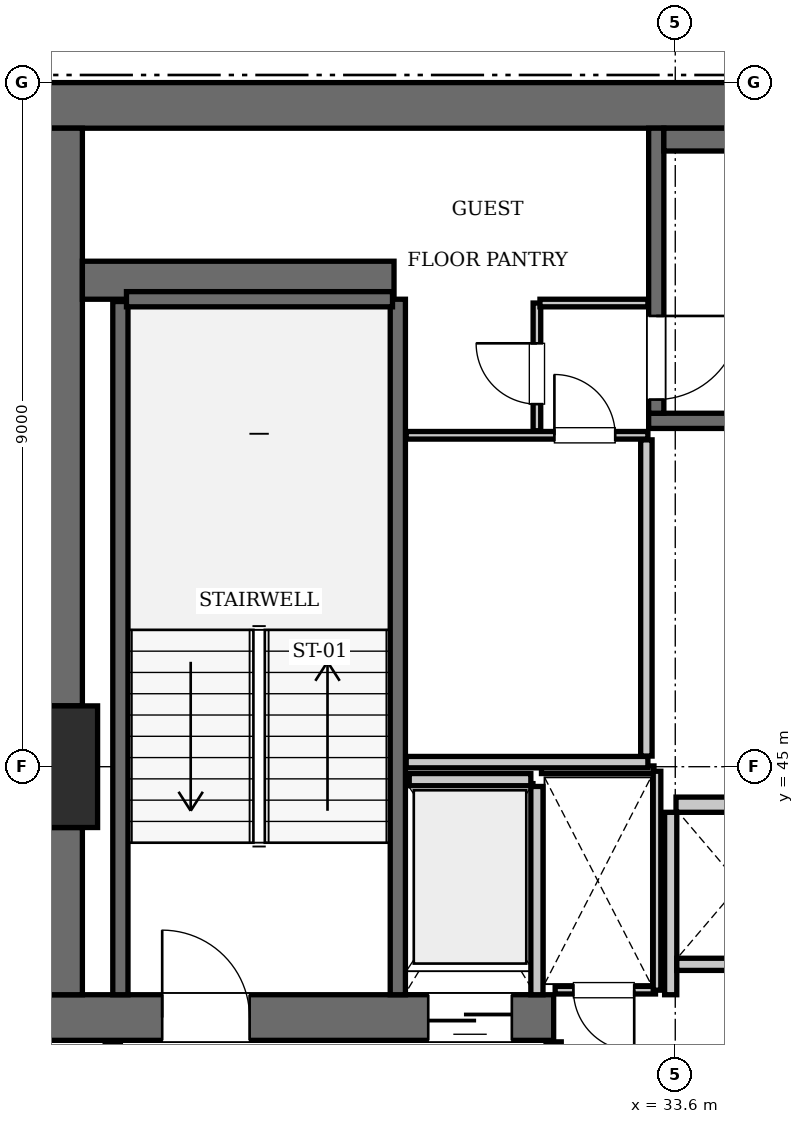
"""IFC4 building model, lengths in metres.
Left out: names, types, materials, properties, quantities, classifications, styles, units other than length and angle.
Written with IfcOpenShell. Run it as: python <this file> out.ifc"""

import sys

from ifc_helpers import new_model, si_unit, direction, frame, frame_2d, origin, origin_2d, place, context, subcontext, project, spatial, rectangle, extrude, element, fill, save


model = new_model("IFC4")
c1 = context("Model", 3, precision=1e-05, world=origin(), true_north=direction((0.0, 1.0)))
c2 = subcontext(c1, "Body", "Model", "MODEL_VIEW")
j1 = project(units=[si_unit("LENGTHUNIT", "METRE"), si_unit("PLANEANGLEUNIT", "RADIAN")], contexts=[c1])
p1 = place(None, origin())
s1 = spatial("IfcSite", under=j1, at=p1, CompositionType="ELEMENT")
p2 = place(p1, origin())
s2 = spatial("IfcBuilding", under=s1, at=p2, CompositionType="ELEMENT")
p3 = place(p2, frame((0.0, 0.0, 277.9)))
s3 = spatial("IfcBuildingStorey", under=s2, at=p3, CompositionType="ELEMENT", Elevation=277.9)
p4 = place(p3, frame((25.2, 45.0, 0.0), z_axis=(0.0, 0.0, 1.0), x_axis=(1.0, 0.0, 0.0)))
e1 = element("IfcColumn", 1, at=p4, inside=s3, PredefinedType="COLUMN", context=c2, shape_type="SweptSolid", body=[
    extrude(rectangle(XDim=1.6, YDim=1.6, at=origin_2d()), origin(), (0.0, 0.0, 1.0), 3.85),
])
p5 = place(p3, frame((25.2, 53.7, 0.0), z_axis=(0.0, 0.0, 1.0), x_axis=(1.0, 0.0, 0.0)))
e2 = element("IfcWall", 2, at=p5, inside=s3, PredefinedType="SHEAR", context=c2, shape_type="SweptSolid", body=[
    extrude(rectangle(XDim=25.2, YDim=0.6, at=frame_2d((12.6, 0.0))), origin(), (0.0, 0.0, 1.0), 3.85),
])
p6 = place(p3, frame((25.2, 41.7, 0.0), z_axis=(0.0, 0.0, 1.0), x_axis=(1.0, 0.0, 0.0)))
e3 = element("IfcWall", 3, at=p6, inside=s3, PredefinedType="SHEAR", context=c2, shape_type="SweptSolid", body=[
    extrude(rectangle(XDim=6.8, YDim=0.6, at=frame_2d((3.4, 0.0))), origin(), (0.0, 0.0, 1.0), 3.85),
])
p7 = place(p6, frame((1.65, 0.0, 0.0)))
e4 = element("IfcOpeningElement", 4, at=p7, cuts=e3, PredefinedType="OPENING", context=c2, shape_type="SweptSolid", body=[
    extrude(rectangle(XDim=1.15, YDim=2.15, at=frame_2d((0.575, 1.075))), frame((0.0, 0.31, 0.0), z_axis=(0.0, -1.0, 0.0), x_axis=(1.0, 0.0, 0.0)), (0.0, 0.0, 1.0), 0.62),
])
p8 = place(p6, frame((5.15, 0.0, 0.0)))
e5 = element("IfcOpeningElement", 5, at=p8, cuts=e3, PredefinedType="OPENING", context=c2, shape_type="SweptSolid", body=[
    extrude(rectangle(XDim=1.1, YDim=2.2, at=frame_2d((0.55, 1.1))), frame((0.0, 0.31, 0.0), z_axis=(0.0, -1.0, 0.0), x_axis=(1.0, 0.0, 0.0)), (0.0, 0.0, 1.0), 0.62),
])
p9 = place(p3, frame((25.5, 42.0, 0.0), z_axis=(0.0, 0.0, 1.0), x_axis=(0.0, 1.0, 0.0)))
e6 = element("IfcWall", 6, at=p9, inside=s3, PredefinedType="SHEAR", context=c2, shape_type="SweptSolid", body=[
    extrude(rectangle(XDim=2.2, YDim=0.6, at=frame_2d((1.1, 0.0))), origin(), (0.0, 0.0, 1.0), 3.85),
])
p10 = place(p3, frame((25.5, 45.8, 0.0), z_axis=(0.0, 0.0, 1.0), x_axis=(0.0, 1.0, 0.0)))
e7 = element("IfcWall", 7, at=p10, inside=s3, PredefinedType="SHEAR", context=c2, shape_type="SweptSolid", body=[
    extrude(rectangle(XDim=7.6, YDim=0.6, at=frame_2d((3.8, 0.0))), origin(), (0.0, 0.0, 1.0), 3.85),
])
p11 = place(p3, frame((25.8, 51.4, 0.0), z_axis=(0.0, 0.0, 1.0), x_axis=(1.0, 0.0, 0.0)))
e8 = element("IfcWall", 8, at=p11, inside=s3, PredefinedType="SHEAR", context=c2, shape_type="SweptSolid", body=[
    extrude(rectangle(XDim=4.1, YDim=0.5, at=frame_2d((2.05, 0.0))), origin(), (0.0, 0.0, 1.0), 3.85),
])
p12 = place(p3, frame((29.95, 42.0, 0.0), z_axis=(0.0, 0.0, 1.0), x_axis=(0.0, 1.0, 0.0)))
e9 = element("IfcWall", 9, at=p12, inside=s3, PredefinedType="SOLIDWALL", context=c2, shape_type="SweptSolid", body=[
    extrude(rectangle(XDim=9.15, YDim=0.2, at=frame_2d((4.575, 0.0))), origin(), (0.0, 0.0, 1.0), 3.61),
])
p13 = place(p3, frame((26.3, 42.0, 0.0), z_axis=(0.0, 0.0, 1.0), x_axis=(0.0, 1.0, 0.0)))
e10 = element("IfcWall", 10, at=p13, inside=s3, PredefinedType="SOLIDWALL", context=c2, shape_type="SweptSolid", body=[
    extrude(rectangle(XDim=9.12, YDim=0.2, at=frame_2d((4.56, 0.0))), origin(), (0.0, 0.0, 1.0), 3.61),
])
p14 = place(p3, frame((26.38, 51.15, 0.0), z_axis=(0.0, 0.0, 1.0), x_axis=(1.0, 0.0, 0.0)))
e11 = element("IfcWall", 11, at=p14, inside=s3, PredefinedType="SOLIDWALL", context=c2, shape_type="SweptSolid", body=[
    extrude(rectangle(XDim=3.5, YDim=0.2, at=frame_2d((1.75, 0.0))), origin(), (0.0, 0.0, 1.0), 3.61),
])
p15 = place(p3, frame((33.25, 49.55, 0.0), z_axis=(0.0, 0.0, 1.0), x_axis=(1.0, 0.0, 0.0)))
e12 = element("IfcWall", 12, at=p15, inside=s3, PredefinedType="SOLIDWALL", context=c2, shape_type="SweptSolid", body=[
    extrude(rectangle(XDim=9.1, YDim=0.2, at=frame_2d((4.55, 0.0))), origin(), (0.0, 0.0, 1.0), 3.61),
])
p16 = place(p3, frame((33.35, 49.65, 0.0), z_axis=(0.0, 0.0, 1.0), x_axis=(0.0, 1.0, 0.0)))
e13 = element("IfcWall", 13, at=p16, inside=s3, PredefinedType="SOLIDWALL", context=c2, shape_type="SweptSolid", body=[
    extrude(rectangle(XDim=3.75, YDim=0.2, at=frame_2d((1.875, 0.0))), origin(), (0.0, 0.0, 1.0), 3.61),
])
p17 = place(p16, frame((0.18, 0.0, 0.0)))
e14 = element("IfcOpeningElement", 14, at=p17, cuts=e13, PredefinedType="OPENING", context=c2, shape_type="SweptSolid", body=[
    extrude(rectangle(XDim=1.1, YDim=2.15, at=frame_2d((0.55, 1.075))), frame((0.0, 0.11, 0.0), z_axis=(0.0, -1.0, 0.0), x_axis=(1.0, 0.0, 0.0)), (0.0, 0.0, 1.0), 0.22),
])
p18 = place(p3, frame((33.45, 53.25, 0.0), z_axis=(0.0, 0.0, 1.0), x_axis=(1.0, 0.0, 0.0)))
e15 = element("IfcWall", 15, at=p18, inside=s3, PredefinedType="SOLIDWALL", context=c2, shape_type="SweptSolid", body=[
    extrude(rectangle(XDim=8.7, YDim=0.3, at=frame_2d((4.35, 0.0))), origin(), (0.0, 0.0, 1.0), 3.61),
])
p19 = place(p3, frame((33.61, 44.5, 0.0), z_axis=(0.0, 0.0, 1.0), x_axis=(1.0, 0.0, 0.0)))
e16 = element("IfcWall", 16, at=p19, inside=s3, PredefinedType="SOLIDWALL", context=c2, shape_type="SweptSolid", body=[
    extrude(rectangle(XDim=1.68, YDim=0.2, at=frame_2d((0.84, 0.0))), origin(), (0.0, 0.0, 1.0), 3.61),
])
p20 = place(p3, frame((30.1, 44.83, 0.0), z_axis=(0.0, 0.0, 1.0), x_axis=(1.0, 0.0, 0.0)))
e17 = element("IfcWall", 17, at=p20, inside=s3, PredefinedType="SOLIDWALL", context=c2, shape_type="SweptSolid", body=[
    extrude(rectangle(XDim=1.6, YDim=0.16, at=frame_2d((0.8, 0.0))), origin(), (0.0, 0.0, 1.0), 3.61),
])
p21 = place(p3, frame((31.78, 42.0, 0.0), z_axis=(0.0, 0.0, 1.0), x_axis=(0.0, 1.0, 0.0)))
e18 = element("IfcWall", 18, at=p21, inside=s3, PredefinedType="SOLIDWALL", context=c2, shape_type="SweptSolid", body=[
    extrude(rectangle(XDim=2.74, YDim=0.16, at=frame_2d((1.37, 0.0))), origin(), (0.0, 0.0, 1.0), 3.61),
])
p22 = place(p3, frame((33.54, 42.0, 0.0), z_axis=(0.0, 0.0, 1.0), x_axis=(0.0, 1.0, 0.0)))
e19 = element("IfcWall", 19, at=p22, inside=s3, PredefinedType="SOLIDWALL", context=c2, shape_type="SweptSolid", body=[
    extrude(rectangle(XDim=2.4, YDim=0.16, at=frame_2d((1.2, 0.0))), origin(), (0.0, 0.0, 1.0), 3.61),
])
p23 = place(p3, frame((33.62, 42.4, 0.0), z_axis=(0.0, 0.0, 1.0), x_axis=(1.0, 0.0, 0.0)))
e20 = element("IfcWall", 20, at=p23, inside=s3, PredefinedType="SOLIDWALL", context=c2, shape_type="SweptSolid", body=[
    extrude(rectangle(XDim=1.66, YDim=0.16, at=frame_2d((0.83, 0.0))), origin(), (0.0, 0.0, 1.0), 3.61),
])
for number, where, z_axis, x_axis in (
    (21, (26.2, 38.31, 0.0), (0.0, 0.0, 1.0), (0.0, 1.0, 0.0)),
    (22, (32.0, 38.31, 0.0), (0.0, 0.0, 1.0), (0.0, 1.0, 0.0)),
):
    element("IfcWall", number, at=place(p3, frame(where, z_axis=z_axis, x_axis=x_axis)), inside=s3, PredefinedType="PARTITIONING", context=c2, shape_type="SweptSolid", body=[
        extrude(rectangle(XDim=3.07, YDim=0.2, at=frame_2d((1.535, 0.0))), origin(), (0.0, 0.0, 1.0), 3.61),
    ])
p24 = place(p3, frame((32.02, 42.06, 0.0), z_axis=(0.0, 0.0, 1.0), x_axis=(1.0, 0.0, 0.0)))
e23 = element("IfcWall", 23, at=p24, inside=s3, PredefinedType="PARTITIONING", context=c2, shape_type="SweptSolid", body=[
    extrude(rectangle(XDim=1.32, YDim=0.1, at=frame_2d((0.66, 0.0))), origin(), (0.0, 0.0, 1.0), 3.61),
])
p25 = place(p24, frame((0.24, 0.0, 0.0)))
e24 = element("IfcOpeningElement", 24, at=p25, cuts=e23, PredefinedType="OPENING", context=c2, shape_type="SweptSolid", body=[
    extrude(rectangle(XDim=0.8, YDim=2.05, at=frame_2d((0.4, 1.025))), frame((0.0, 0.06, 0.0), z_axis=(0.0, -1.0, 0.0), x_axis=(1.0, 0.0, 0.0)), (0.0, 0.0, 1.0), 0.12),
])
p26 = place(p3, frame((31.84, 44.96, 0.0), z_axis=(0.0, 0.0, 1.0), x_axis=(1.0, 0.0, 0.0)))
e25 = element("IfcWall", 25, at=p26, inside=s3, PredefinedType="PARTITIONING", context=c2, shape_type="SweptSolid", body=[
    extrude(rectangle(XDim=1.48, YDim=0.1, at=frame_2d((0.74, 0.0))), origin(), (0.0, 0.0, 1.0), 3.61),
])
p27 = place(p3, frame((33.36, 42.06, 0.0), z_axis=(0.0, 0.0, 1.0), x_axis=(0.0, 1.0, 0.0)))
e26 = element("IfcWall", 26, at=p27, inside=s3, PredefinedType="PARTITIONING", context=c2, shape_type="SweptSolid", body=[
    extrude(rectangle(XDim=2.88, YDim=0.1, at=frame_2d((1.44, 0.0))), origin(), (0.0, 0.0, 1.0), 3.61),
])
p28 = place(p3, frame((30.06, 45.06, 0.0), z_axis=(0.0, 0.0, 1.0), x_axis=(1.0, 0.0, 0.0)))
e27 = element("IfcWall", 27, at=p28, inside=s3, PredefinedType="PARTITIONING", context=c2, shape_type="SweptSolid", body=[
    extrude(rectangle(XDim=3.18, YDim=0.15, at=frame_2d((1.59, 0.0))), origin(), (0.0, 0.0, 1.0), 3.61),
])
p29 = place(p3, frame((33.22, 45.14, 0.0), z_axis=(0.0, 0.0, 1.0), x_axis=(0.0, 1.0, 0.0)))
e28 = element("IfcWall", 28, at=p29, inside=s3, PredefinedType="PARTITIONING", context=c2, shape_type="SweptSolid", body=[
    extrude(rectangle(XDim=4.16, YDim=0.15, at=frame_2d((2.08, 0.0))), origin(), (0.0, 0.0, 1.0), 3.61),
])
p30 = place(p3, frame((30.06, 49.36, 0.0), z_axis=(0.0, 0.0, 1.0), x_axis=(1.0, 0.0, 0.0)))
e29 = element("IfcWall", 29, at=p30, inside=s3, PredefinedType="PARTITIONING", context=c2, shape_type="SweptSolid", body=[
    extrude(rectangle(XDim=3.18, YDim=0.1, at=frame_2d((1.59, 0.0))), origin(), (0.0, 0.0, 1.0), 3.61),
])
p31 = place(p30, frame((1.95, 0.0, 0.0)))
e30 = element("IfcOpeningElement", 30, at=p31, cuts=e29, PredefinedType="OPENING", context=c2, shape_type="SweptSolid", body=[
    extrude(rectangle(XDim=0.8, YDim=2.05, at=frame_2d((0.4, 1.025))), frame((0.0, 0.06, 0.0), z_axis=(0.0, -1.0, 0.0), x_axis=(1.0, 0.0, 0.0)), (0.0, 0.0, 1.0), 0.12),
])
p32 = place(p3, frame((31.78, 49.42, 0.0), z_axis=(0.0, 0.0, 1.0), x_axis=(0.0, 1.0, 0.0)))
e31 = element("IfcWall", 31, at=p32, inside=s3, PredefinedType="PARTITIONING", context=c2, shape_type="SweptSolid", body=[
    extrude(rectangle(XDim=1.68, YDim=0.1, at=frame_2d((0.84, 0.0))), origin(), (0.0, 0.0, 1.0), 3.61),
])
p33 = place(p32, frame((0.35, 0.0, 0.0)))
e32 = element("IfcOpeningElement", 32, at=p33, cuts=e31, PredefinedType="OPENING", context=c2, shape_type="SweptSolid", body=[
    extrude(rectangle(XDim=0.8, YDim=2.05, at=frame_2d((0.4, 1.025))), frame((0.0, 0.06, 0.0), z_axis=(0.0, -1.0, 0.0), x_axis=(1.0, 0.0, 0.0)), (0.0, 0.0, 1.0), 0.12),
])
p34 = place(p3, frame((31.82, 51.1, 0.0), z_axis=(0.0, 0.0, 1.0), x_axis=(1.0, 0.0, 0.0)))
e33 = element("IfcWall", 33, at=p34, inside=s3, PredefinedType="PARTITIONING", context=c2, shape_type="SweptSolid", body=[
    extrude(rectangle(XDim=1.42, YDim=0.1, at=frame_2d((0.71, 0.0))), origin(), (0.0, 0.0, 1.0), 3.61),
])
p35 = place(p7, origin())
e34 = element("IfcDoor", 34, at=p35, inside=s3, OperationType="SINGLE_SWING_LEFT", PredefinedType="DOOR", context=c2, shape_type="SweptSolid", body=[
    extrude(rectangle(XDim=1.15, YDim=2.15, at=frame_2d((0.575, 1.075))), frame((0.0, 0.025, 0.0), z_axis=(0.0, -1.0, 0.0), x_axis=(1.0, 0.0, 0.0)), (0.0, 0.0, 1.0), 0.05),
])
fill(e4, e34)
p36 = place(p17, frame((1.1, 0.0, 0.0), z_axis=(0.0, 0.0, 1.0), x_axis=(-1.0, 0.0, 0.0)))
e35 = element("IfcDoor", 35, at=p36, inside=s3, OperationType="SINGLE_SWING_LEFT", PredefinedType="DOOR", context=c2, shape_type="SweptSolid", body=[
    extrude(rectangle(XDim=1.1, YDim=2.15, at=frame_2d((0.55, 1.075))), frame((0.0, 0.025, 0.0), z_axis=(0.0, -1.0, 0.0), x_axis=(1.0, 0.0, 0.0)), (0.0, 0.0, 1.0), 0.05),
])
fill(e14, e35)
p37 = place(p8, frame((1.1, 0.0, 0.0), z_axis=(0.0, 0.0, 1.0), x_axis=(-1.0, 0.0, 0.0)))
e36 = element("IfcDoor", 36, at=p37, inside=s3, OperationType="SLIDING_TO_LEFT", PredefinedType="DOOR", context=c2, shape_type="SweptSolid", body=[
    extrude(rectangle(XDim=1.1, YDim=2.2, at=frame_2d((0.55, 1.1))), frame((0.0, 0.025, 0.0), z_axis=(0.0, -1.0, 0.0), x_axis=(1.0, 0.0, 0.0)), (0.0, 0.0, 1.0), 0.05),
])
fill(e5, e36)
p38 = place(p25, frame((0.8, 0.0, 0.0), z_axis=(0.0, 0.0, 1.0), x_axis=(-1.0, 0.0, 0.0)))
e37 = element("IfcDoor", 37, at=p38, inside=s3, OperationType="SINGLE_SWING_LEFT", PredefinedType="DOOR", context=c2, shape_type="SweptSolid", body=[
    extrude(rectangle(XDim=0.8, YDim=2.05, at=frame_2d((0.4, 1.025))), frame((0.0, 0.025, 0.0), z_axis=(0.0, -1.0, 0.0), x_axis=(1.0, 0.0, 0.0)), (0.0, 0.0, 1.0), 0.05),
])
fill(e24, e37)
p39 = place(p31, origin())
e38 = element("IfcDoor", 38, at=p39, inside=s3, OperationType="SINGLE_SWING_LEFT", PredefinedType="DOOR", context=c2, shape_type="SweptSolid", body=[
    extrude(rectangle(XDim=0.8, YDim=2.05, at=frame_2d((0.4, 1.025))), frame((0.0, 0.025, 0.0), z_axis=(0.0, -1.0, 0.0), x_axis=(1.0, 0.0, 0.0)), (0.0, 0.0, 1.0), 0.05),
])
fill(e30, e38)
p40 = place(p33, origin())
e39 = element("IfcDoor", 39, at=p40, inside=s3, OperationType="SINGLE_SWING_RIGHT", PredefinedType="DOOR", context=c2, shape_type="SweptSolid", body=[
    extrude(rectangle(XDim=0.8, YDim=2.05, at=frame_2d((0.4, 1.025))), frame((0.0, 0.025, 0.0), z_axis=(0.0, -1.0, 0.0), x_axis=(1.0, 0.0, 0.0)), (0.0, 0.0, 1.0), 0.05),
])
fill(e32, e39)
save(model, sys.argv[1])
